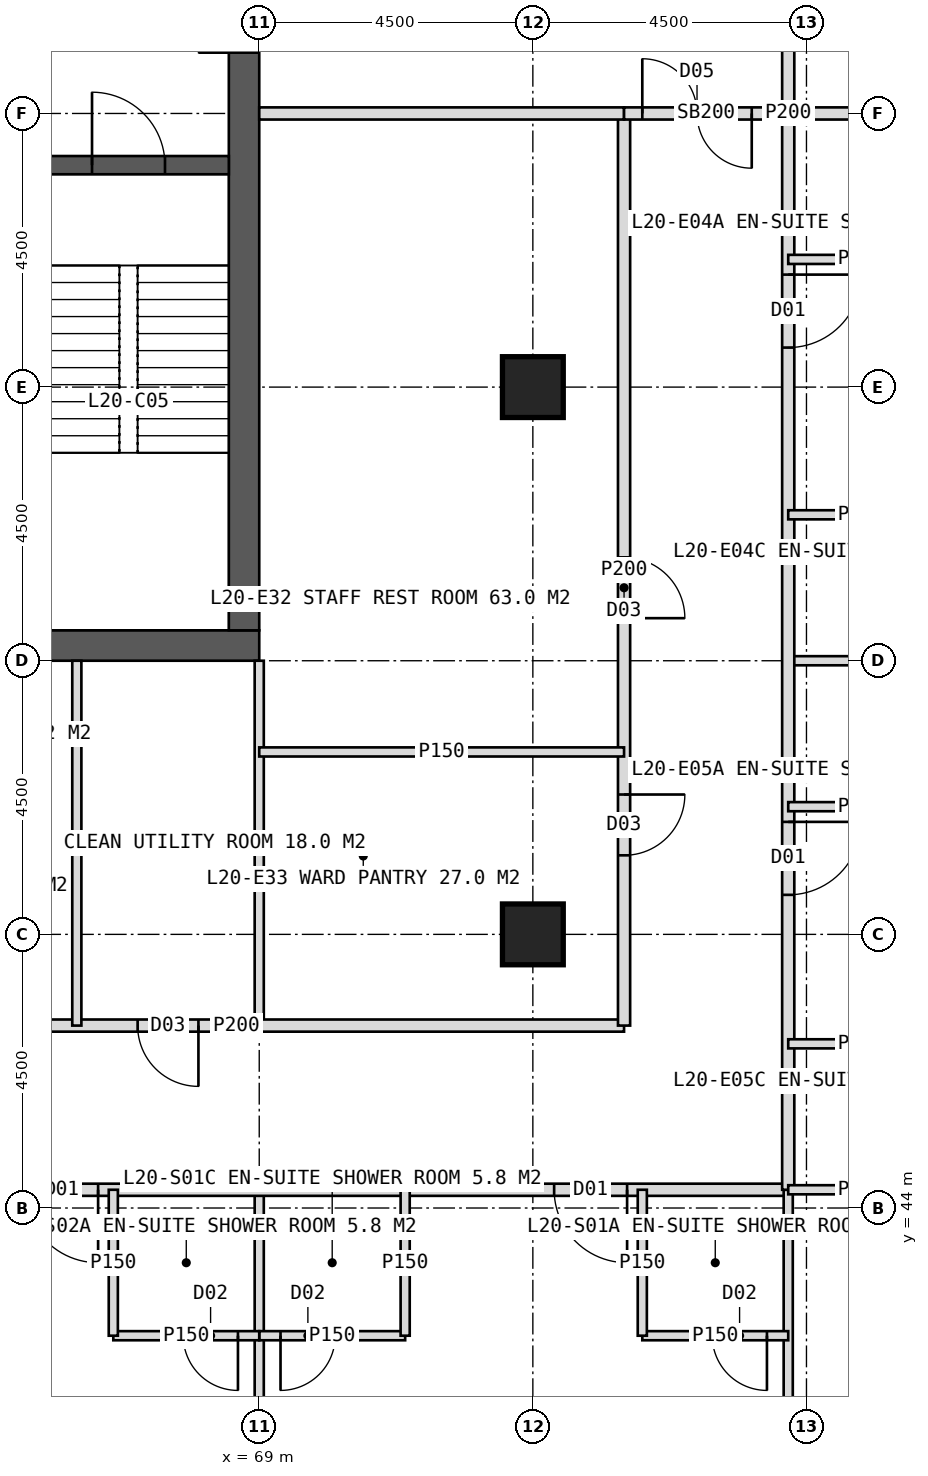
"""IFC4 building model, lengths in metres.
Left out: names, types, materials, properties, quantities, classifications, styles, units other than length and angle.
Written with IfcOpenShell. Run it as: python <this file> out.ifc"""

import sys

from ifc_helpers import new_model, si_unit, direction, frame, frame_2d, origin, origin_2d, place, context, subcontext, project, spatial, rectangle, hollow_rectangle, extrude, element, fill, save


model = new_model("IFC4")
c1 = context("Model", 3, precision=1e-05, world=origin(), true_north=direction((0.0, 1.0)))
c2 = subcontext(c1, "Body", "Model", "MODEL_VIEW")
j1 = project(units=[si_unit("LENGTHUNIT", "METRE"), si_unit("PLANEANGLEUNIT", "RADIAN")], contexts=[c1])
p1 = place(None, origin())
s1 = spatial("IfcSite", under=j1, at=p1, CompositionType="ELEMENT")
p2 = place(p1, origin())
s2 = spatial("IfcBuilding", under=s1, at=p2, CompositionType="ELEMENT")
p3 = place(p2, frame((0.0, 0.0, 87.0)))
s3 = spatial("IfcBuildingStorey", under=s2, at=p3, CompositionType="ELEMENT", Elevation=87.0)
p4 = place(p3, frame((51.0, 53.25, 0.0), z_axis=(0.0, 0.0, 1.0), x_axis=(1.0, 0.0, 0.0)))
e1 = element("IfcWall", 1, at=p4, inside=s3, PredefinedType="SHEAR", context=c2, shape_type="SweptSolid", body=[
    extrude(rectangle(XDim=18.0, YDim=0.5, at=frame_2d((9.0, 0.0))), origin(), (0.0, 0.0, 1.0), 4.0),
])
p5 = place(p4, frame((8.1, 0.0, 0.0)))
e2 = element("IfcOpeningElement", 2, at=p5, cuts=e1, PredefinedType="OPENING", context=c2, shape_type="SweptSolid", body=[
    extrude(rectangle(XDim=1.8, YDim=2.2, at=frame_2d((0.9, 1.1))), frame((0.0, 0.26, 0.0), z_axis=(0.0, -1.0, 0.0), x_axis=(1.0, 0.0, 0.0)), (0.0, 0.0, 1.0), 0.52),
])
p6 = place(p3, frame((68.75, 53.5, 0.0), z_axis=(0.0, 0.0, 1.0), x_axis=(0.0, 1.0, 0.0)))
e3 = element("IfcWall", 3, at=p6, inside=s3, PredefinedType="SHEAR", context=c2, shape_type="SweptSolid", body=[
    extrude(rectangle(XDim=17.0, YDim=0.5, at=frame_2d((8.5, 0.0))), origin(), (0.0, 0.0, 1.0), 4.0),
])
p7 = place(p6, frame((9.5, 0.0, 0.0)))
e4 = element("IfcOpeningElement", 4, at=p7, cuts=e3, PredefinedType="OPENING", context=c2, shape_type="SweptSolid", body=[
    extrude(rectangle(XDim=1.5, YDim=2.2, at=frame_2d((0.75, 1.1))), frame((0.0, 0.26, 0.0), z_axis=(0.0, -1.0, 0.0), x_axis=(1.0, 0.0, 0.0)), (0.0, 0.0, 1.0), 0.52),
])
p8 = place(p3, frame((65.2, 61.15, 0.0), z_axis=(0.0, 0.0, 1.0), x_axis=(1.0, 0.0, 0.0)))
e5 = element("IfcWall", 5, at=p8, inside=s3, PredefinedType="SHEAR", context=c2, shape_type="SweptSolid", body=[
    extrude(rectangle(XDim=3.3, YDim=0.3, at=frame_2d((1.65, 0.0))), origin(), (0.0, 0.0, 1.0), 4.0),
])
p9 = place(p8, frame((1.05, 0.0, 0.0)))
e6 = element("IfcOpeningElement", 6, at=p9, cuts=e5, PredefinedType="OPENING", context=c2, shape_type="SweptSolid", body=[
    extrude(rectangle(XDim=1.2, YDim=2.1, at=frame_2d((0.6, 1.05))), frame((0.0, 0.16, 0.0), z_axis=(0.0, -1.0, 0.0), x_axis=(1.0, 0.0, 0.0)), (0.0, 0.0, 1.0), 0.32),
])
for number, where, z_axis, x_axis in (
    (7, (73.5, 48.5, 0.0), (0.0, 0.0, 1.0), (1.0, 0.0, 0.0)),
    (8, (73.5, 57.5, 0.0), (0.0, 0.0, 1.0), (1.0, 0.0, 0.0)),
):
    element("IfcColumn", number, at=place(p3, frame(where, z_axis=z_axis, x_axis=x_axis)), inside=s3, PredefinedType="COLUMN", context=c2, shape_type="SweptSolid", body=[
        extrude(hollow_rectangle(XDim=1.0, YDim=1.0, WallThickness=0.1, at=origin_2d()), origin(), (0.0, 0.0, 1.0), 4.0),
    ])
p10 = place(p3, frame((69.0, 44.3, 0.0), z_axis=(0.0, 0.0, 1.0), x_axis=(0.0, -1.0, 0.0)))
e9 = element("IfcWall", 9, at=p10, inside=s3, PredefinedType="PARTITIONING", context=c2, shape_type="SweptSolid", body=[
    extrude(rectangle(XDim=7.575, YDim=0.15, at=frame_2d((3.788, 0.0))), origin(), (0.0, 0.0, 1.0), 3.75),
])
p11 = place(p3, frame((77.7, 44.3, 0.0), z_axis=(0.0, 0.0, 1.0), x_axis=(-1.0, 0.0, 0.0)))
e10 = element("IfcWall", 10, at=p11, inside=s3, PredefinedType="PARTITIONING", context=c2, shape_type="SweptSolid", body=[
    extrude(rectangle(XDim=35.4, YDim=0.2, at=frame_2d((17.7, 0.0))), origin(), (0.0, 0.0, 1.0), 3.75),
])
p12 = place(p11, frame((2.65, 0.0, 0.0)))
e11 = element("IfcOpeningElement", 11, at=p12, cuts=e10, PredefinedType="OPENING", context=c2, shape_type="SweptSolid", body=[
    extrude(rectangle(XDim=1.2, YDim=2.2, at=frame_2d((0.6, 1.1))), frame((0.0, 0.11, 0.0), z_axis=(0.0, -1.0, 0.0), x_axis=(1.0, 0.0, 0.0)), (0.0, 0.0, 1.0), 0.22),
])
p13 = place(p11, frame((11.35, 0.0, 0.0)))
e12 = element("IfcOpeningElement", 12, at=p13, cuts=e10, PredefinedType="OPENING", context=c2, shape_type="SweptSolid", body=[
    extrude(rectangle(XDim=1.2, YDim=2.2, at=frame_2d((0.6, 1.1))), frame((0.0, 0.11, 0.0), z_axis=(0.0, -1.0, 0.0), x_axis=(1.0, 0.0, 0.0)), (0.0, 0.0, 1.0), 0.22),
])
p14 = place(p11, frame((20.35, 0.0, 0.0)))
e13 = element("IfcOpeningElement", 13, at=p14, cuts=e10, PredefinedType="OPENING", context=c2, shape_type="SweptSolid", body=[
    extrude(rectangle(XDim=1.2, YDim=2.2, at=frame_2d((0.6, 1.1))), frame((0.0, 0.11, 0.0), z_axis=(0.0, -1.0, 0.0), x_axis=(1.0, 0.0, 0.0)), (0.0, 0.0, 1.0), 0.22),
])
p15 = place(p11, frame((29.35, 0.0, 0.0)))
e14 = element("IfcOpeningElement", 14, at=p15, cuts=e10, PredefinedType="OPENING", context=c2, shape_type="SweptSolid", body=[
    extrude(rectangle(XDim=1.2, YDim=2.2, at=frame_2d((0.6, 1.1))), frame((0.0, 0.11, 0.0), z_axis=(0.0, -1.0, 0.0), x_axis=(1.0, 0.0, 0.0)), (0.0, 0.0, 1.0), 0.22),
])
p16 = place(p3, frame((77.7, 44.3, 0.0), z_axis=(0.0, 0.0, 1.0), x_axis=(0.0, -1.0, 0.0)))
e15 = element("IfcWall", 15, at=p16, inside=s3, PredefinedType="PARTITIONING", context=c2, shape_type="SweptSolid", body=[
    extrude(rectangle(XDim=7.575, YDim=0.15, at=frame_2d((3.788, 0.0))), origin(), (0.0, 0.0, 1.0), 3.75),
])
p17 = place(p3, frame((77.7, 41.9, 0.0), z_axis=(0.0, 0.0, 1.0), x_axis=(-1.0, 0.0, 0.0)))
e16 = element("IfcWall", 16, at=p17, inside=s3, PredefinedType="PARTITIONING", context=c2, shape_type="SweptSolid", body=[
    extrude(rectangle(XDim=2.4, YDim=0.15, at=frame_2d((1.2, 0.0))), origin(), (0.0, 0.0, 1.0), 3.75),
])
p18 = place(p17, frame((0.35, 0.0, 0.0)))
e17 = element("IfcOpeningElement", 17, at=p18, cuts=e16, PredefinedType="OPENING", context=c2, shape_type="SweptSolid", body=[
    extrude(rectangle(XDim=0.9, YDim=2.1, at=frame_2d((0.45, 1.05))), frame((0.0, 0.085, 0.0), z_axis=(0.0, -1.0, 0.0), x_axis=(1.0, 0.0, 0.0)), (0.0, 0.0, 1.0), 0.17),
])
p19 = place(p3, frame((75.3, 44.3, 0.0), z_axis=(0.0, 0.0, 1.0), x_axis=(0.0, -1.0, 0.0)))
e18 = element("IfcWall", 18, at=p19, inside=s3, PredefinedType="PARTITIONING", context=c2, shape_type="SweptSolid", body=[
    extrude(rectangle(XDim=2.4, YDim=0.15, at=frame_2d((1.2, 0.0))), origin(), (0.0, 0.0, 1.0), 3.75),
])
p20 = place(p3, frame((71.4, 41.9, 0.0), z_axis=(0.0, 0.0, 1.0), x_axis=(-1.0, 0.0, 0.0)))
e19 = element("IfcWall", 19, at=p20, inside=s3, PredefinedType="PARTITIONING", context=c2, shape_type="SweptSolid", body=[
    extrude(rectangle(XDim=2.4, YDim=0.15, at=frame_2d((1.2, 0.0))), origin(), (0.0, 0.0, 1.0), 3.75),
])
p21 = place(p20, frame((1.15, 0.0, 0.0)))
e20 = element("IfcOpeningElement", 20, at=p21, cuts=e19, PredefinedType="OPENING", context=c2, shape_type="SweptSolid", body=[
    extrude(rectangle(XDim=0.9, YDim=2.1, at=frame_2d((0.45, 1.05))), frame((0.0, 0.085, 0.0), z_axis=(0.0, -1.0, 0.0), x_axis=(1.0, 0.0, 0.0)), (0.0, 0.0, 1.0), 0.17),
])
p22 = place(p3, frame((71.4, 44.3, 0.0), z_axis=(0.0, 0.0, 1.0), x_axis=(0.0, -1.0, 0.0)))
e21 = element("IfcWall", 21, at=p22, inside=s3, PredefinedType="PARTITIONING", context=c2, shape_type="SweptSolid", body=[
    extrude(rectangle(XDim=2.4, YDim=0.15, at=frame_2d((1.2, 0.0))), origin(), (0.0, 0.0, 1.0), 3.75),
])
p23 = place(p3, frame((69.0, 41.9, 0.0), z_axis=(0.0, 0.0, 1.0), x_axis=(-1.0, 0.0, 0.0)))
e22 = element("IfcWall", 22, at=p23, inside=s3, PredefinedType="PARTITIONING", context=c2, shape_type="SweptSolid", body=[
    extrude(rectangle(XDim=2.4, YDim=0.15, at=frame_2d((1.2, 0.0))), origin(), (0.0, 0.0, 1.0), 3.75),
])
p24 = place(p23, frame((0.35, 0.0, 0.0)))
e23 = element("IfcOpeningElement", 23, at=p24, cuts=e22, PredefinedType="OPENING", context=c2, shape_type="SweptSolid", body=[
    extrude(rectangle(XDim=0.9, YDim=2.1, at=frame_2d((0.45, 1.05))), frame((0.0, 0.085, 0.0), z_axis=(0.0, -1.0, 0.0), x_axis=(1.0, 0.0, 0.0)), (0.0, 0.0, 1.0), 0.17),
])
p25 = place(p3, frame((66.6, 44.3, 0.0), z_axis=(0.0, 0.0, 1.0), x_axis=(0.0, -1.0, 0.0)))
e24 = element("IfcWall", 24, at=p25, inside=s3, PredefinedType="PARTITIONING", context=c2, shape_type="SweptSolid", body=[
    extrude(rectangle(XDim=2.4, YDim=0.15, at=frame_2d((1.2, 0.0))), origin(), (0.0, 0.0, 1.0), 3.75),
])
p26 = place(p3, frame((69.0, 53.0, 0.0), z_axis=(0.0, 0.0, 1.0), x_axis=(0.0, -1.0, 0.0)))
e25 = element("IfcWall", 25, at=p26, inside=s3, PredefinedType="PARTITIONING", context=c2, shape_type="SweptSolid", body=[
    extrude(rectangle(XDim=6.0, YDim=0.15, at=frame_2d((3.0, 0.0))), origin(), (0.0, 0.0, 1.0), 3.75),
])
p27 = place(p3, frame((75.0, 47.0, 0.0), z_axis=(0.0, 0.0, 1.0), x_axis=(-1.0, 0.0, 0.0)))
e26 = element("IfcWall", 26, at=p27, inside=s3, PredefinedType="PARTITIONING", context=c2, shape_type="SweptSolid", body=[
    extrude(rectangle(XDim=12.75, YDim=0.2, at=frame_2d((6.375, 0.0))), origin(), (0.0, 0.0, 1.0), 3.75),
])
p28 = place(p27, frame((7.0, 0.0, 0.0)))
e27 = element("IfcOpeningElement", 27, at=p28, cuts=e26, PredefinedType="OPENING", context=c2, shape_type="SweptSolid", body=[
    extrude(rectangle(XDim=1.0, YDim=2.1, at=frame_2d((0.5, 1.05))), frame((0.0, 0.11, 0.0), z_axis=(0.0, -1.0, 0.0), x_axis=(1.0, 0.0, 0.0)), (0.0, 0.0, 1.0), 0.22),
])
p29 = place(p27, frame((11.425, 0.0, 0.0)))
e28 = element("IfcOpeningElement", 28, at=p29, cuts=e26, PredefinedType="OPENING", context=c2, shape_type="SweptSolid", body=[
    extrude(rectangle(XDim=1.0, YDim=2.1, at=frame_2d((0.5, 1.05))), frame((0.0, 0.11, 0.0), z_axis=(0.0, -1.0, 0.0), x_axis=(1.0, 0.0, 0.0)), (0.0, 0.0, 1.0), 0.22),
])
p30 = place(p3, frame((66.0, 53.0, 0.0), z_axis=(0.0, 0.0, 1.0), x_axis=(0.0, -1.0, 0.0)))
e29 = element("IfcWall", 29, at=p30, inside=s3, PredefinedType="PARTITIONING", context=c2, shape_type="SweptSolid", body=[
    extrude(rectangle(XDim=6.0, YDim=0.15, at=frame_2d((3.0, 0.0))), origin(), (0.0, 0.0, 1.0), 3.75),
])
p31 = place(p3, frame((77.7, 62.0, 0.0), z_axis=(0.0, 0.0, 1.0), x_axis=(1.0, 0.0, 0.0)))
e30 = element("IfcWall", 30, at=p31, inside=s3, PredefinedType="SOLIDWALL", context=c2, shape_type="SweptSolid", body=[
    extrude(rectangle(XDim=7.575, YDim=0.2, at=frame_2d((3.788, 0.0))), origin(), (0.0, 0.0, 1.0), 2.75),
])
p32 = place(p3, frame((77.7, 53.0, 0.0), z_axis=(0.0, 0.0, 1.0), x_axis=(1.0, 0.0, 0.0)))
e31 = element("IfcWall", 31, at=p32, inside=s3, PredefinedType="PARTITIONING", context=c2, shape_type="SweptSolid", body=[
    extrude(rectangle(XDim=7.575, YDim=0.15, at=frame_2d((3.788, 0.0))), origin(), (0.0, 0.0, 1.0), 3.75),
])
p33 = place(p3, frame((77.7, 79.7, 0.0), z_axis=(0.0, 0.0, 1.0), x_axis=(0.0, -1.0, 0.0)))
e32 = element("IfcWall", 32, at=p33, inside=s3, PredefinedType="PARTITIONING", context=c2, shape_type="SweptSolid", body=[
    extrude(rectangle(XDim=35.4, YDim=0.2, at=frame_2d((17.7, 0.0))), origin(), (0.0, 0.0, 1.0), 3.75),
])
p34 = place(p33, frame((2.65, 0.0, 0.0)))
e33 = element("IfcOpeningElement", 33, at=p34, cuts=e32, PredefinedType="OPENING", context=c2, shape_type="SweptSolid", body=[
    extrude(rectangle(XDim=1.2, YDim=2.2, at=frame_2d((0.6, 1.1))), frame((0.0, 0.11, 0.0), z_axis=(0.0, -1.0, 0.0), x_axis=(1.0, 0.0, 0.0)), (0.0, 0.0, 1.0), 0.22),
])
p35 = place(p33, frame((8.35, 0.0, 0.0)))
e34 = element("IfcOpeningElement", 34, at=p35, cuts=e32, PredefinedType="OPENING", context=c2, shape_type="SweptSolid", body=[
    extrude(rectangle(XDim=1.2, YDim=2.2, at=frame_2d((0.6, 1.1))), frame((0.0, 0.11, 0.0), z_axis=(0.0, -1.0, 0.0), x_axis=(1.0, 0.0, 0.0)), (0.0, 0.0, 1.0), 0.22),
])
p36 = place(p33, frame((14.35, 0.0, 0.0)))
e35 = element("IfcOpeningElement", 35, at=p36, cuts=e32, PredefinedType="OPENING", context=c2, shape_type="SweptSolid", body=[
    extrude(rectangle(XDim=1.2, YDim=2.2, at=frame_2d((0.6, 1.1))), frame((0.0, 0.11, 0.0), z_axis=(0.0, -1.0, 0.0), x_axis=(1.0, 0.0, 0.0)), (0.0, 0.0, 1.0), 0.22),
])
p37 = place(p33, frame((20.35, 0.0, 0.0)))
e36 = element("IfcOpeningElement", 36, at=p37, cuts=e32, PredefinedType="OPENING", context=c2, shape_type="SweptSolid", body=[
    extrude(rectangle(XDim=1.2, YDim=2.2, at=frame_2d((0.6, 1.1))), frame((0.0, 0.11, 0.0), z_axis=(0.0, -1.0, 0.0), x_axis=(1.0, 0.0, 0.0)), (0.0, 0.0, 1.0), 0.22),
])
p38 = place(p33, frame((29.35, 0.0, 0.0)))
e37 = element("IfcOpeningElement", 37, at=p38, cuts=e32, PredefinedType="OPENING", context=c2, shape_type="SweptSolid", body=[
    extrude(rectangle(XDim=1.2, YDim=2.2, at=frame_2d((0.6, 1.1))), frame((0.0, 0.11, 0.0), z_axis=(0.0, -1.0, 0.0), x_axis=(1.0, 0.0, 0.0)), (0.0, 0.0, 1.0), 0.22),
])
for number, where, z_axis, x_axis in (
    (38, (77.7, 59.6, 0.0), (0.0, 0.0, 1.0), (1.0, 0.0, 0.0)),
    (39, (77.7, 55.4, 0.0), (0.0, 0.0, 1.0), (1.0, 0.0, 0.0)),
    (40, (77.7, 50.6, 0.0), (0.0, 0.0, 1.0), (1.0, 0.0, 0.0)),
    (41, (77.7, 46.7, 0.0), (0.0, 0.0, 1.0), (1.0, 0.0, 0.0)),
    (42, (77.7, 44.3, 0.0), (0.0, 0.0, 1.0), (1.0, 0.0, 0.0)),
):
    element("IfcWall", number, at=place(p3, frame(where, z_axis=z_axis, x_axis=x_axis)), inside=s3, PredefinedType="PARTITIONING", context=c2, shape_type="SweptSolid", body=[
        extrude(rectangle(XDim=2.4, YDim=0.15, at=frame_2d((1.2, 0.0))), origin(), (0.0, 0.0, 1.0), 3.75),
    ])
p39 = place(p3, frame((75.0, 62.0, 0.0), z_axis=(0.0, 0.0, 1.0), x_axis=(0.0, -1.0, 0.0)))
e43 = element("IfcWall", 43, at=p39, inside=s3, PredefinedType="PARTITIONING", context=c2, shape_type="SweptSolid", body=[
    extrude(rectangle(XDim=15.0, YDim=0.2, at=frame_2d((7.5, 0.0))), origin(), (0.0, 0.0, 1.0), 3.75),
])
p40 = place(p39, frame((7.3, 0.0, 0.0)))
e44 = element("IfcOpeningElement", 44, at=p40, cuts=e43, PredefinedType="OPENING", context=c2, shape_type="SweptSolid", body=[
    extrude(rectangle(XDim=1.0, YDim=2.1, at=frame_2d((0.5, 1.05))), frame((0.0, 0.11, 0.0), z_axis=(0.0, -1.0, 0.0), x_axis=(1.0, 0.0, 0.0)), (0.0, 0.0, 1.0), 0.22),
])
p41 = place(p39, frame((11.2, 0.0, 0.0)))
e45 = element("IfcOpeningElement", 45, at=p41, cuts=e43, PredefinedType="OPENING", context=c2, shape_type="SweptSolid", body=[
    extrude(rectangle(XDim=1.0, YDim=2.1, at=frame_2d((0.5, 1.05))), frame((0.0, 0.11, 0.0), z_axis=(0.0, -1.0, 0.0), x_axis=(1.0, 0.0, 0.0)), (0.0, 0.0, 1.0), 0.22),
])
p42 = place(p3, frame((69.0, 62.0, 0.0), z_axis=(0.0, 0.0, 1.0), x_axis=(1.0, 0.0, 0.0)))
e46 = element("IfcWall", 46, at=p42, inside=s3, PredefinedType="SOLIDWALL", context=c2, shape_type="SweptSolid", body=[
    extrude(rectangle(XDim=6.0, YDim=0.2, at=frame_2d((3.0, 0.0))), origin(), (0.0, 0.0, 1.0), 2.75),
])
p43 = place(p3, frame((69.0, 51.5, 0.0), z_axis=(0.0, 0.0, 1.0), x_axis=(1.0, 0.0, 0.0)))
e47 = element("IfcWall", 47, at=p43, inside=s3, PredefinedType="PARTITIONING", context=c2, shape_type="SweptSolid", body=[
    extrude(rectangle(XDim=6.0, YDim=0.15, at=frame_2d((3.0, 0.0))), origin(), (0.0, 0.0, 1.0), 3.75),
])
p44 = place(p3, frame((75.0, 62.0, 0.0), z_axis=(0.0, 0.0, 1.0), x_axis=(1.0, 0.0, 0.0)))
e48 = element("IfcWall", 48, at=p44, inside=s3, PredefinedType="SOLIDWALL", context=c2, shape_type="SweptSolid", body=[
    extrude(rectangle(XDim=2.7, YDim=0.2, at=frame_2d((1.35, 0.0))), origin(), (0.0, 0.0, 1.0), 2.75),
])
p45 = place(p44, frame((0.3, 0.0, 0.0)))
e49 = element("IfcOpeningElement", 49, at=p45, cuts=e48, PredefinedType="OPENING", context=c2, shape_type="SweptSolid", body=[
    extrude(rectangle(XDim=1.8, YDim=2.2, at=frame_2d((0.9, 1.1))), frame((0.0, 0.11, 0.0), z_axis=(0.0, -1.0, 0.0), x_axis=(1.0, 0.0, 0.0)), (0.0, 0.0, 1.0), 0.22),
])
p46 = place(p12, origin())
e50 = element("IfcDoor", 50, at=p46, inside=s3, OperationType="SINGLE_SWING_LEFT", PredefinedType="DOOR", context=c2, shape_type="SweptSolid", body=[
    extrude(rectangle(XDim=1.2, YDim=2.2, at=frame_2d((0.6, 1.1))), frame((0.0, 0.025, 0.0), z_axis=(0.0, -1.0, 0.0), x_axis=(1.0, 0.0, 0.0)), (0.0, 0.0, 1.0), 0.05),
])
fill(e11, e50)
p47 = place(p18, origin())
e51 = element("IfcDoor", 51, at=p47, inside=s3, OperationType="SINGLE_SWING_LEFT", PredefinedType="DOOR", context=c2, shape_type="SweptSolid", body=[
    extrude(rectangle(XDim=0.9, YDim=2.1, at=frame_2d((0.45, 1.05))), frame((0.0, 0.025, 0.0), z_axis=(0.0, -1.0, 0.0), x_axis=(1.0, 0.0, 0.0)), (0.0, 0.0, 1.0), 0.05),
])
fill(e17, e51)
p48 = place(p21, origin())
e52 = element("IfcDoor", 52, at=p48, inside=s3, OperationType="SINGLE_SWING_RIGHT", PredefinedType="DOOR", context=c2, shape_type="SweptSolid", body=[
    extrude(rectangle(XDim=0.9, YDim=2.1, at=frame_2d((0.45, 1.05))), frame((0.0, 0.025, 0.0), z_axis=(0.0, -1.0, 0.0), x_axis=(1.0, 0.0, 0.0)), (0.0, 0.0, 1.0), 0.05),
])
fill(e20, e52)
p49 = place(p13, origin())
e53 = element("IfcDoor", 53, at=p49, inside=s3, OperationType="SINGLE_SWING_LEFT", PredefinedType="DOOR", context=c2, shape_type="SweptSolid", body=[
    extrude(rectangle(XDim=1.2, YDim=2.2, at=frame_2d((0.6, 1.1))), frame((0.0, 0.025, 0.0), z_axis=(0.0, -1.0, 0.0), x_axis=(1.0, 0.0, 0.0)), (0.0, 0.0, 1.0), 0.05),
])
fill(e12, e53)
p50 = place(p24, origin())
e54 = element("IfcDoor", 54, at=p50, inside=s3, OperationType="SINGLE_SWING_LEFT", PredefinedType="DOOR", context=c2, shape_type="SweptSolid", body=[
    extrude(rectangle(XDim=0.9, YDim=2.1, at=frame_2d((0.45, 1.05))), frame((0.0, 0.025, 0.0), z_axis=(0.0, -1.0, 0.0), x_axis=(1.0, 0.0, 0.0)), (0.0, 0.0, 1.0), 0.05),
])
fill(e23, e54)
p51 = place(p28, origin())
e55 = element("IfcDoor", 55, at=p51, inside=s3, OperationType="SINGLE_SWING_LEFT", PredefinedType="DOOR", context=c2, shape_type="SweptSolid", body=[
    extrude(rectangle(XDim=1.0, YDim=2.1, at=frame_2d((0.5, 1.05))), frame((0.0, 0.025, 0.0), z_axis=(0.0, -1.0, 0.0), x_axis=(1.0, 0.0, 0.0)), (0.0, 0.0, 1.0), 0.05),
])
fill(e27, e55)
p52 = place(p37, origin())
e56 = element("IfcDoor", 56, at=p52, inside=s3, OperationType="SINGLE_SWING_LEFT", PredefinedType="DOOR", context=c2, shape_type="SweptSolid", body=[
    extrude(rectangle(XDim=1.2, YDim=2.2, at=frame_2d((0.6, 1.1))), frame((0.0, 0.025, 0.0), z_axis=(0.0, -1.0, 0.0), x_axis=(1.0, 0.0, 0.0)), (0.0, 0.0, 1.0), 0.05),
])
fill(e36, e56)
p53 = place(p38, origin())
e57 = element("IfcDoor", 57, at=p53, inside=s3, OperationType="SINGLE_SWING_LEFT", PredefinedType="DOOR", context=c2, shape_type="SweptSolid", body=[
    extrude(rectangle(XDim=1.2, YDim=2.2, at=frame_2d((0.6, 1.1))), frame((0.0, 0.025, 0.0), z_axis=(0.0, -1.0, 0.0), x_axis=(1.0, 0.0, 0.0)), (0.0, 0.0, 1.0), 0.05),
])
fill(e37, e57)
p54 = place(p40, origin())
e58 = element("IfcDoor", 58, at=p54, inside=s3, OperationType="SINGLE_SWING_RIGHT", PredefinedType="DOOR", context=c2, shape_type="SweptSolid", body=[
    extrude(rectangle(XDim=1.0, YDim=2.1, at=frame_2d((0.5, 1.05))), frame((0.0, 0.025, 0.0), z_axis=(0.0, -1.0, 0.0), x_axis=(1.0, 0.0, 0.0)), (0.0, 0.0, 1.0), 0.05),
])
fill(e44, e58)
p55 = place(p41, origin())
e59 = element("IfcDoor", 59, at=p55, inside=s3, OperationType="SINGLE_SWING_LEFT", PredefinedType="DOOR", context=c2, shape_type="SweptSolid", body=[
    extrude(rectangle(XDim=1.0, YDim=2.1, at=frame_2d((0.5, 1.05))), frame((0.0, 0.025, 0.0), z_axis=(0.0, -1.0, 0.0), x_axis=(1.0, 0.0, 0.0)), (0.0, 0.0, 1.0), 0.05),
])
fill(e45, e59)
p56 = place(p45, origin())
e60 = element("IfcDoor", 60, at=p56, inside=s3, OperationType="DOUBLE_DOOR_DOUBLE_SWING", PredefinedType="DOOR", context=c2, shape_type="SweptSolid", body=[
    extrude(rectangle(XDim=1.8, YDim=2.2, at=frame_2d((0.9, 1.1))), frame((0.0, 0.025, 0.0), z_axis=(0.0, -1.0, 0.0), x_axis=(1.0, 0.0, 0.0)), (0.0, 0.0, 1.0), 0.05),
])
fill(e49, e60)
p57 = place(p9, origin())
e61 = element("IfcDoor", 61, at=p57, inside=s3, OperationType="SINGLE_SWING_LEFT", PredefinedType="DOOR", context=c2, shape_type="SweptSolid", body=[
    extrude(rectangle(XDim=1.2, YDim=2.1, at=frame_2d((0.6, 1.05))), frame((0.0, 0.025, 0.0), z_axis=(0.0, -1.0, 0.0), x_axis=(1.0, 0.0, 0.0)), (0.0, 0.0, 1.0), 0.05),
])
fill(e6, e61)
save(model, sys.argv[1])
